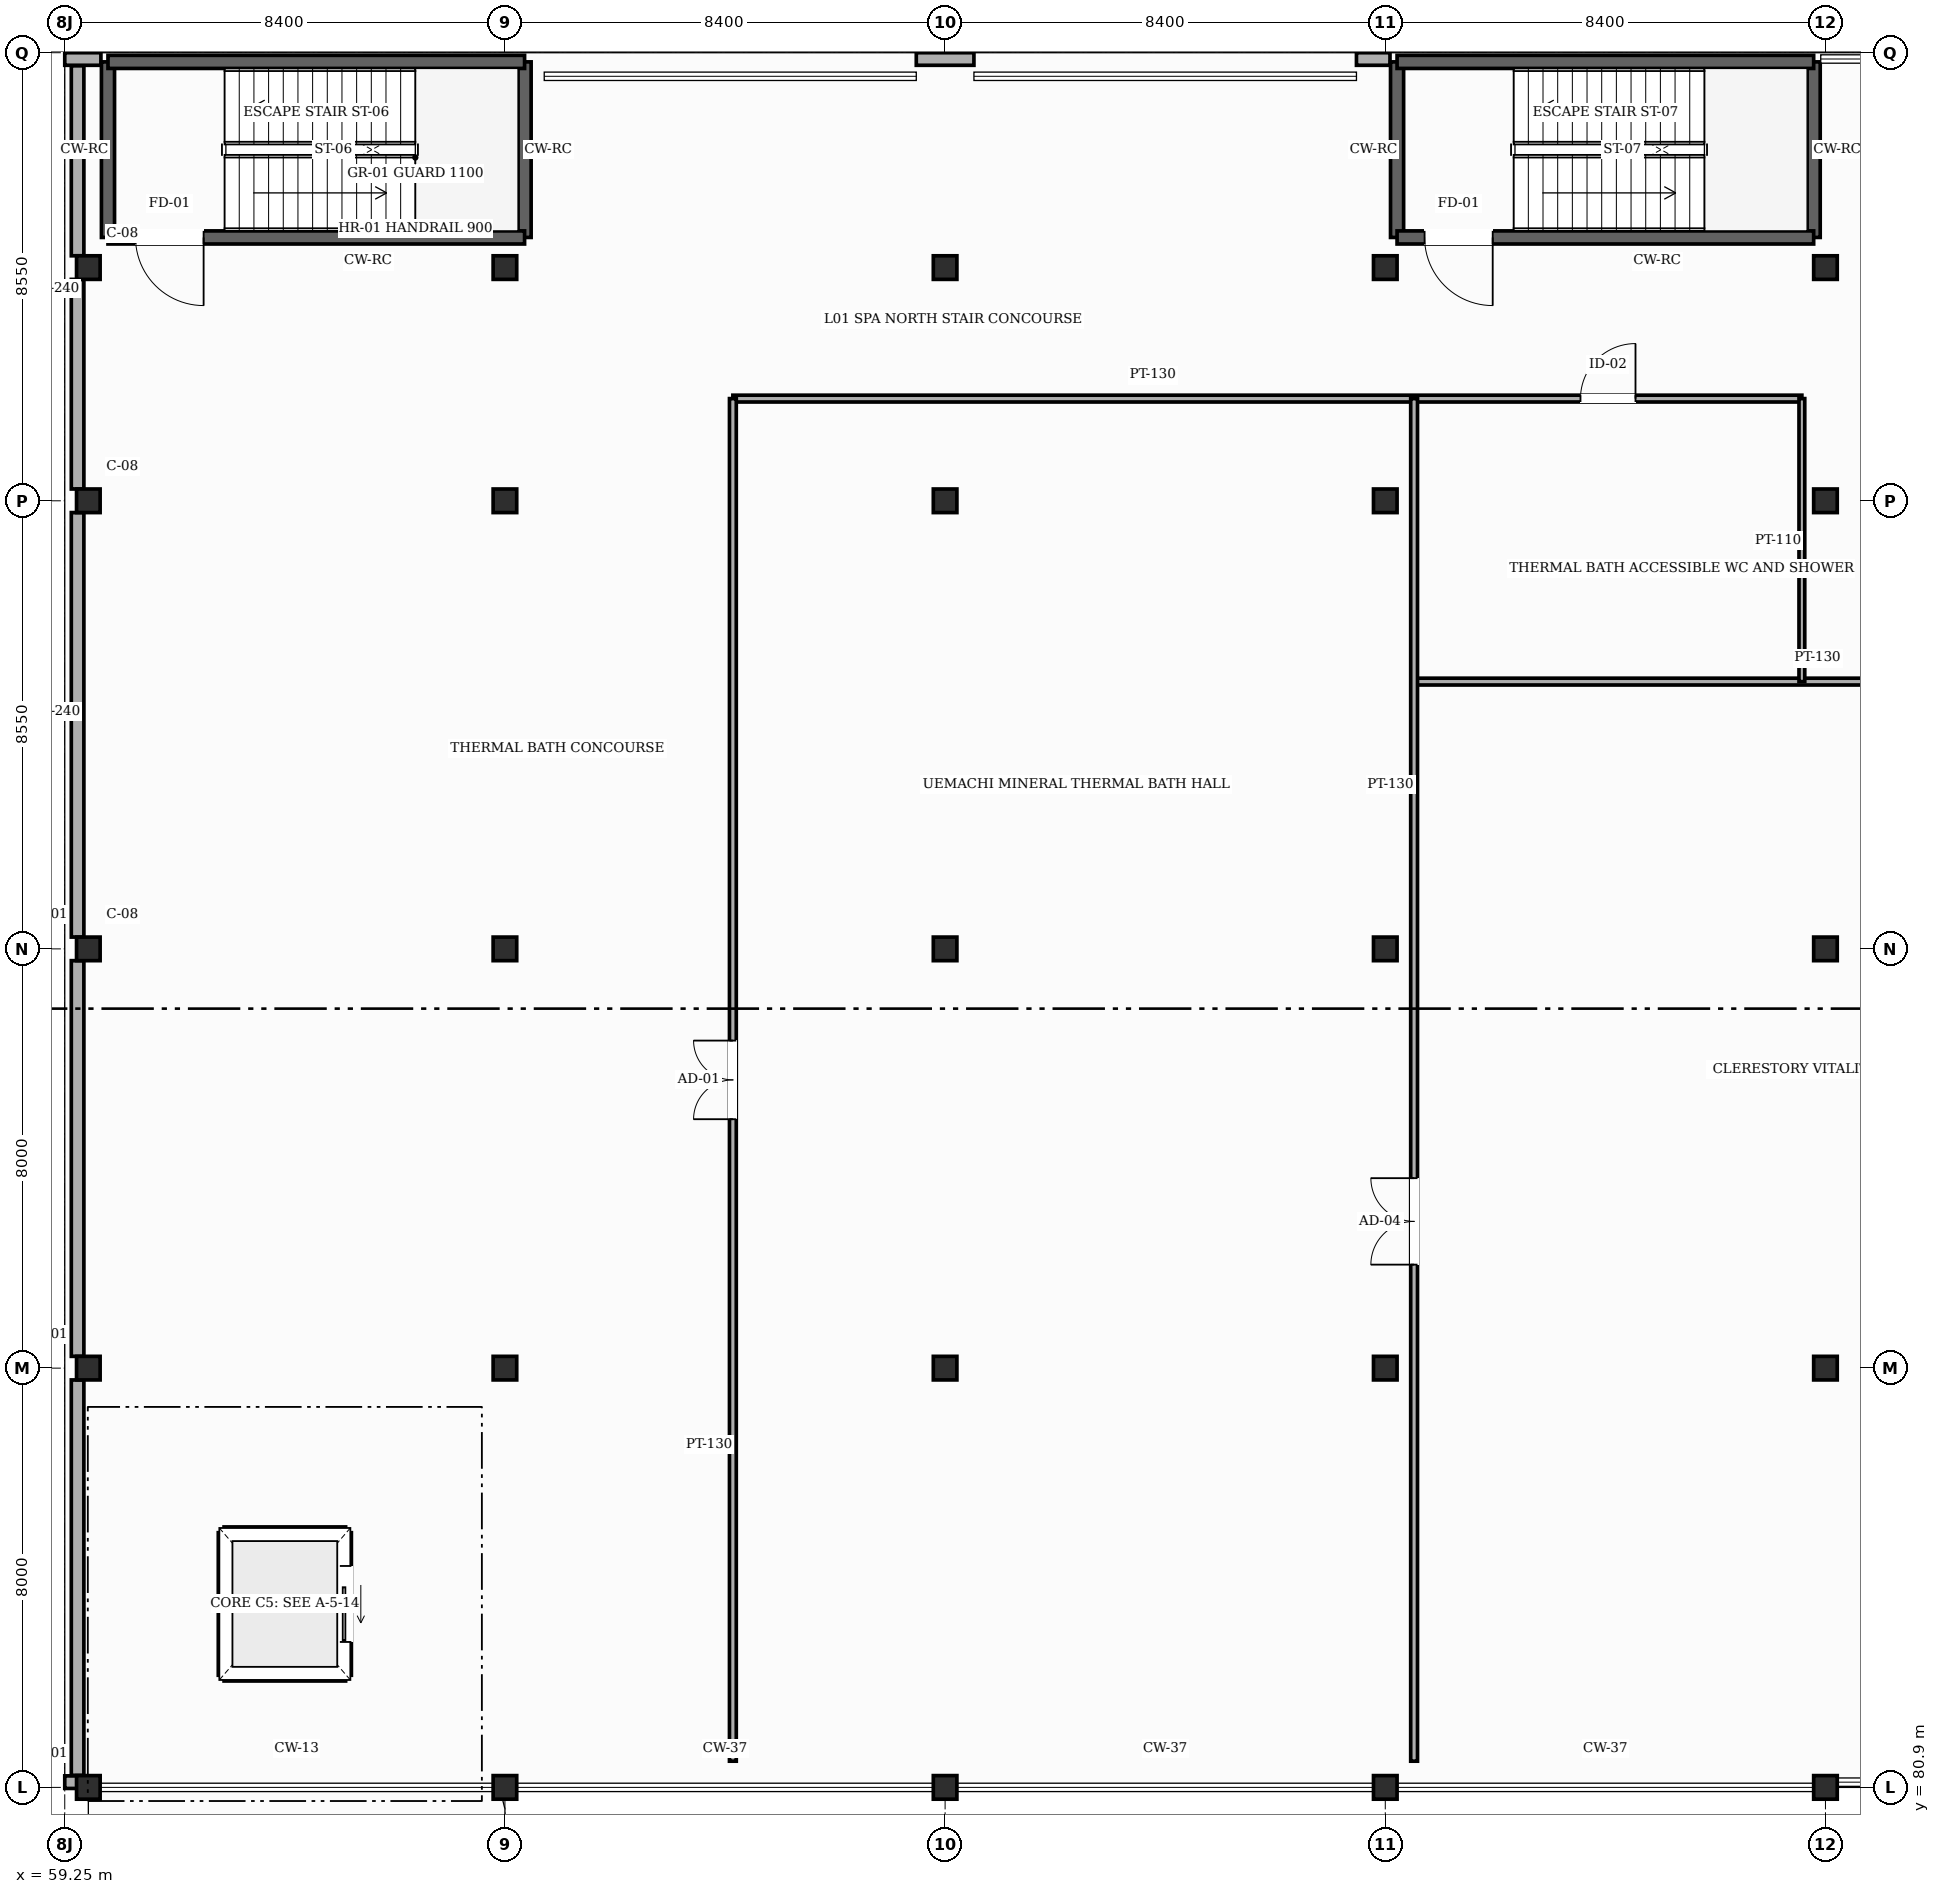
"""IFC4 building model, lengths in metres.
Left out: names, types, materials, properties, quantities, classifications, styles, units other than length and angle.
Written with IfcOpenShell. Run it as: python <this file> out.ifc"""

import sys

from ifc_helpers import new_model, si_unit, direction, frame, frame_2d, origin, origin_2d, place, context, subcontext, project, spatial, rectangle, hollow_rectangle, extrude, element, fill, save


model = new_model("IFC4")
c1 = context("Model", 3, precision=1e-05, world=origin(), true_north=direction((0.0, 1.0)))
c2 = subcontext(c1, "Body", "Model", "MODEL_VIEW")
j1 = project(units=[si_unit("LENGTHUNIT", "METRE"), si_unit("PLANEANGLEUNIT", "RADIAN")], contexts=[c1])
p1 = place(None, origin())
s1 = spatial("IfcSite", under=j1, at=p1, CompositionType="ELEMENT")
p2 = place(p1, origin())
s2 = spatial("IfcBuilding", under=s1, at=p2, CompositionType="ELEMENT")
p3 = place(p2, frame((0.0, 0.0, 5.4)))
s3 = spatial("IfcBuildingStorey", under=s2, at=p3, CompositionType="ELEMENT", Elevation=5.4)
for number, where, z_axis, x_axis in (
    (1, (59.7, 80.9, 0.0), (0.0, 0.0, 1.0), (1.0, 0.0, 0.0)),
    (2, (59.7, 88.9, 0.0), (0.0, 0.0, 1.0), (1.0, 0.0, 0.0)),
    (3, (59.7, 96.9, 0.0), (0.0, 0.0, 1.0), (1.0, 0.0, 0.0)),
    (4, (59.7, 105.45, 0.0), (0.0, 0.0, 1.0), (1.0, 0.0, 0.0)),
    (5, (59.7, 109.9, 0.0), (0.0, 0.0, 1.0), (1.0, 0.0, 0.0)),
    (6, (67.65, 80.9, 0.0), (0.0, 0.0, 1.0), (1.0, 0.0, 0.0)),
    (7, (67.65, 88.9, 0.0), (0.0, 0.0, 1.0), (1.0, 0.0, 0.0)),
    (8, (67.65, 96.9, 0.0), (0.0, 0.0, 1.0), (1.0, 0.0, 0.0)),
    (9, (67.65, 105.45, 0.0), (0.0, 0.0, 1.0), (1.0, 0.0, 0.0)),
    (10, (67.65, 109.9, 0.0), (0.0, 0.0, 1.0), (1.0, 0.0, 0.0)),
    (11, (76.05, 80.9, 0.0), (0.0, 0.0, 1.0), (1.0, 0.0, 0.0)),
    (12, (76.05, 88.9, 0.0), (0.0, 0.0, 1.0), (1.0, 0.0, 0.0)),
    (13, (76.05, 96.9, 0.0), (0.0, 0.0, 1.0), (1.0, 0.0, 0.0)),
    (14, (76.05, 105.45, 0.0), (0.0, 0.0, 1.0), (1.0, 0.0, 0.0)),
    (15, (76.05, 109.9, 0.0), (0.0, 0.0, 1.0), (1.0, 0.0, 0.0)),
    (16, (84.45, 80.9, 0.0), (0.0, 0.0, 1.0), (1.0, 0.0, 0.0)),
    (17, (84.45, 88.9, 0.0), (0.0, 0.0, 1.0), (1.0, 0.0, 0.0)),
    (18, (84.45, 96.9, 0.0), (0.0, 0.0, 1.0), (1.0, 0.0, 0.0)),
    (19, (84.45, 105.45, 0.0), (0.0, 0.0, 1.0), (1.0, 0.0, 0.0)),
    (20, (84.45, 109.9, 0.0), (0.0, 0.0, 1.0), (1.0, 0.0, 0.0)),
    (21, (92.85, 80.9, 0.0), (0.0, 0.0, 1.0), (1.0, 0.0, 0.0)),
    (22, (92.85, 88.9, 0.0), (0.0, 0.0, 1.0), (1.0, 0.0, 0.0)),
    (23, (92.85, 96.9, 0.0), (0.0, 0.0, 1.0), (1.0, 0.0, 0.0)),
    (24, (92.85, 105.45, 0.0), (0.0, 0.0, 1.0), (1.0, 0.0, 0.0)),
    (25, (92.85, 109.9, 0.0), (0.0, 0.0, 1.0), (1.0, 0.0, 0.0)),
):
    element("IfcColumn", number, at=place(p3, frame(where, z_axis=z_axis, x_axis=x_axis)), inside=s3, PredefinedType="COLUMN", context=c2, shape_type="SweptSolid", body=[
        extrude(hollow_rectangle(XDim=0.45, YDim=0.45, WallThickness=0.019, InnerFilletRadius=0.019, OuterFilletRadius=0.038, at=origin_2d()), origin(), (0.0, 0.0, 1.0), 4.8),
    ])
p4 = place(p3, frame((59.925, 81.0, 0.0), z_axis=(0.0, 0.0, 1.0), x_axis=(-1.0, 0.0, 0.0)))
e26 = element("IfcWall", 26, at=p4, inside=s3, PredefinedType="SOLIDWALL", context=c2, shape_type="SweptSolid", body=[
    extrude(rectangle(XDim=0.675, YDim=0.24, at=frame_2d((0.337, 0.0))), origin(), (0.0, 0.0, 1.0), 4.535),
])
p5 = place(p3, frame((59.25, 113.88, 0.0), z_axis=(0.0, 0.0, 1.0), x_axis=(1.0, 0.0, 0.0)))
e27 = element("IfcWall", 27, at=p5, inside=s3, PredefinedType="SOLIDWALL", context=c2, shape_type="SweptSolid", body=[
    extrude(rectangle(XDim=0.69, YDim=0.24, at=frame_2d((0.345, 0.0))), origin(), (0.0, 0.0, 1.0), 4.535),
])
p6 = place(p3, frame((75.5, 113.88, 0.0), z_axis=(0.0, 0.0, 1.0), x_axis=(1.0, 0.0, 0.0)))
e28 = element("IfcWall", 28, at=p6, inside=s3, PredefinedType="SOLIDWALL", context=c2, shape_type="SweptSolid", body=[
    extrude(rectangle(XDim=1.1, YDim=0.24, at=frame_2d((0.55, 0.0))), origin(), (0.0, 0.0, 1.0), 4.535),
])
p7 = place(p3, frame((83.9, 113.88, 0.0), z_axis=(0.0, 0.0, 1.0), x_axis=(1.0, 0.0, 0.0)))
e29 = element("IfcWall", 29, at=p7, inside=s3, PredefinedType="SOLIDWALL", context=c2, shape_type="SweptSolid", body=[
    extrude(rectangle(XDim=0.64, YDim=0.24, at=frame_2d((0.32, 0.0))), origin(), (0.0, 0.0, 1.0), 4.535),
])
p8 = place(p3, frame((59.495, 81.13, 0.0), z_axis=(0.0, 0.0, 1.0), x_axis=(0.0, 1.0, 0.0)))
e30 = element("IfcWall", 30, at=p8, inside=s3, PredefinedType="SOLIDWALL", context=c2, shape_type="SweptSolid", body=[
    extrude(rectangle(XDim=7.545, YDim=0.24, at=frame_2d((3.772, 0.0))), origin(), (0.0, 0.0, 1.0), 3.875),
])
p9 = place(p3, frame((59.495, 89.125, 0.0), z_axis=(0.0, 0.0, 1.0), x_axis=(0.0, 1.0, 0.0)))
e31 = element("IfcWall", 31, at=p9, inside=s3, PredefinedType="SOLIDWALL", context=c2, shape_type="SweptSolid", body=[
    extrude(rectangle(XDim=7.55, YDim=0.24, at=frame_2d((3.775, 0.0))), origin(), (0.0, 0.0, 1.0), 3.875),
])
p10 = place(p3, frame((59.495, 97.125, 0.0), z_axis=(0.0, 0.0, 1.0), x_axis=(0.0, 1.0, 0.0)))
e32 = element("IfcWall", 32, at=p10, inside=s3, PredefinedType="SOLIDWALL", context=c2, shape_type="SweptSolid", body=[
    extrude(rectangle(XDim=8.1, YDim=0.24, at=frame_2d((4.05, 0.0))), origin(), (0.0, 0.0, 1.0), 3.875),
])
p11 = place(p3, frame((59.495, 105.675, 0.0), z_axis=(0.0, 0.0, 1.0), x_axis=(0.0, 1.0, 0.0)))
e33 = element("IfcWall", 33, at=p11, inside=s3, PredefinedType="SOLIDWALL", context=c2, shape_type="SweptSolid", body=[
    extrude(rectangle(XDim=4.0, YDim=0.24, at=frame_2d((2.0, 0.0))), origin(), (0.0, 0.0, 1.0), 3.875),
])
p12 = place(p3, frame((59.495, 110.125, 0.0), z_axis=(0.0, 0.0, 1.0), x_axis=(0.0, 1.0, 0.0)))
e34 = element("IfcWall", 34, at=p12, inside=s3, PredefinedType="SOLIDWALL", context=c2, shape_type="SweptSolid", body=[
    extrude(rectangle(XDim=3.625, YDim=0.24, at=frame_2d((1.812, 0.0))), origin(), (0.0, 0.0, 1.0), 4.535),
])
for number, where, z_axis, x_axis in (
    (35, (60.075, 110.475, 0.0), (0.0, 0.0, 1.0), (0.0, 1.0, 0.0)),
    (36, (68.025, 113.825, 0.0), (0.0, 0.0, 1.0), (0.0, -1.0, 0.0)),
):
    element("IfcWall", number, at=place(p3, frame(where, z_axis=z_axis, x_axis=x_axis)), inside=s3, PredefinedType="SHEAR", context=c2, shape_type="SweptSolid", body=[
        extrude(rectangle(XDim=3.35, YDim=0.25, at=frame_2d((1.675, 0.0))), origin(), (0.0, 0.0, 1.0), 4.55),
    ])
p13 = place(p3, frame((68.025, 110.475, 0.0), z_axis=(0.0, 0.0, 1.0), x_axis=(-1.0, 0.0, 0.0)))
e37 = element("IfcWall", 37, at=p13, inside=s3, PredefinedType="SHEAR", context=c2, shape_type="SweptSolid", body=[
    extrude(rectangle(XDim=7.95, YDim=0.25, at=frame_2d((3.975, 0.0))), origin(), (0.0, 0.0, 1.0), 4.55),
])
p14 = place(p13, frame((6.125, 0.0, 0.0)))
e38 = element("IfcOpeningElement", 38, at=p14, cuts=e37, PredefinedType="OPENING", context=c2, shape_type="SweptSolid", body=[
    extrude(rectangle(XDim=1.3, YDim=2.2, at=frame_2d((0.65, 1.1))), frame((0.0, 0.135, 0.0), z_axis=(0.0, -1.0, 0.0), x_axis=(1.0, 0.0, 0.0)), (0.0, 0.0, 1.0), 0.27),
])
p15 = place(p3, frame((60.075, 113.825, 0.0), z_axis=(0.0, 0.0, 1.0), x_axis=(1.0, 0.0, 0.0)))
e39 = element("IfcWall", 39, at=p15, inside=s3, PredefinedType="SHEAR", context=c2, shape_type="SweptSolid", body=[
    extrude(rectangle(XDim=7.95, YDim=0.25, at=frame_2d((3.975, 0.0))), origin(), (0.0, 0.0, 1.0), 4.55),
])
for number, where, z_axis, x_axis in (
    (40, (84.675, 110.475, 0.0), (0.0, 0.0, 1.0), (0.0, 1.0, 0.0)),
    (41, (92.625, 113.825, 0.0), (0.0, 0.0, 1.0), (0.0, -1.0, 0.0)),
):
    element("IfcWall", number, at=place(p3, frame(where, z_axis=z_axis, x_axis=x_axis)), inside=s3, PredefinedType="SHEAR", context=c2, shape_type="SweptSolid", body=[
        extrude(rectangle(XDim=3.35, YDim=0.25, at=frame_2d((1.675, 0.0))), origin(), (0.0, 0.0, 1.0), 4.55),
    ])
p16 = place(p3, frame((92.625, 110.475, 0.0), z_axis=(0.0, 0.0, 1.0), x_axis=(-1.0, 0.0, 0.0)))
e42 = element("IfcWall", 42, at=p16, inside=s3, PredefinedType="SHEAR", context=c2, shape_type="SweptSolid", body=[
    extrude(rectangle(XDim=7.95, YDim=0.25, at=frame_2d((3.975, 0.0))), origin(), (0.0, 0.0, 1.0), 4.55),
])
p17 = place(p16, frame((6.125, 0.0, 0.0)))
e43 = element("IfcOpeningElement", 43, at=p17, cuts=e42, PredefinedType="OPENING", context=c2, shape_type="SweptSolid", body=[
    extrude(rectangle(XDim=1.3, YDim=2.2, at=frame_2d((0.65, 1.1))), frame((0.0, 0.135, 0.0), z_axis=(0.0, -1.0, 0.0), x_axis=(1.0, 0.0, 0.0)), (0.0, 0.0, 1.0), 0.27),
])
p18 = place(p3, frame((84.675, 113.825, 0.0), z_axis=(0.0, 0.0, 1.0), x_axis=(1.0, 0.0, 0.0)))
e44 = element("IfcWall", 44, at=p18, inside=s3, PredefinedType="SHEAR", context=c2, shape_type="SweptSolid", body=[
    extrude(rectangle(XDim=7.95, YDim=0.25, at=frame_2d((3.975, 0.0))), origin(), (0.0, 0.0, 1.0), 4.55),
])
for number, where, z_axis, x_axis in (
    (45, (62.29, 85.76, 0.0), (0.0, 0.0, 1.0), (1.0, 0.0, 0.0)),
    (46, (62.29, 83.04, 0.0), (0.0, 0.0, 1.0), (1.0, 0.0, 0.0)),
):
    element("IfcWall", number, at=place(p3, frame(where, z_axis=z_axis, x_axis=x_axis)), inside=s3, PredefinedType="SHEAR", context=c2, shape_type="SweptSolid", body=[
        extrude(rectangle(XDim=2.32, YDim=0.22, at=frame_2d((1.16, 0.0))), origin(), (0.0, 0.0, 1.0), 4.55),
    ])
p19 = place(p3, frame((64.61, 83.04, 0.0), z_axis=(0.0, 0.0, 1.0), x_axis=(0.0, 1.0, 0.0)))
e47 = element("IfcWall", 47, at=p19, inside=s3, PredefinedType="SHEAR", context=c2, shape_type="SweptSolid", body=[
    extrude(rectangle(XDim=2.72, YDim=0.22, at=frame_2d((1.36, 0.0))), origin(), (0.0, 0.0, 1.0), 4.55),
])
p20 = place(p19, frame((0.635, 0.0, 0.0)))
e48 = element("IfcOpeningElement", 48, at=p20, cuts=e47, PredefinedType="OPENING", context=c2, shape_type="SweptSolid", body=[
    extrude(rectangle(XDim=1.45, YDim=2.35, at=frame_2d((0.725, 1.175))), frame((0.0, 0.12, 0.0), z_axis=(0.0, -1.0, 0.0), x_axis=(1.0, 0.0, 0.0)), (0.0, 0.0, 1.0), 0.24),
])
p21 = place(p3, frame((62.29, 83.04, 0.0), z_axis=(0.0, 0.0, 1.0), x_axis=(0.0, 1.0, 0.0)))
e49 = element("IfcWall", 49, at=p21, inside=s3, PredefinedType="SHEAR", context=c2, shape_type="SweptSolid", body=[
    extrude(rectangle(XDim=2.72, YDim=0.22, at=frame_2d((1.36, 0.0))), origin(), (0.0, 0.0, 1.0), 4.55),
])
p22 = place(p3, frame((85.0, 102.0, 0.0), z_axis=(0.0, 0.0, 1.0), x_axis=(1.0, 0.0, 0.0)))
e50 = element("IfcWall", 50, at=p22, inside=s3, PredefinedType="PARTITIONING", context=c2, shape_type="SweptSolid", body=[
    extrude(rectangle(XDim=15.4, YDim=0.13, at=frame_2d((7.7, 0.0))), origin(), (0.0, 0.0, 1.0), 4.535),
])
p23 = place(p3, frame((72.0, 107.4, 0.0), z_axis=(0.0, 0.0, 1.0), x_axis=(1.0, 0.0, 0.0)))
e51 = element("IfcWall", 51, at=p23, inside=s3, PredefinedType="PARTITIONING", context=c2, shape_type="SweptSolid", body=[
    extrude(rectangle(XDim=20.4, YDim=0.13, at=frame_2d((10.2, 0.0))), origin(), (0.0, 0.0, 1.0), 4.125),
])
p24 = place(p23, frame((16.175, 0.0, 0.0)))
e52 = element("IfcOpeningElement", 52, at=p24, cuts=e51, PredefinedType="OPENING", context=c2, shape_type="SweptSolid", body=[
    extrude(rectangle(XDim=1.05, YDim=2.2, at=frame_2d((0.525, 1.1))), frame((0.0, 0.075, 0.0), z_axis=(0.0, -1.0, 0.0), x_axis=(1.0, 0.0, 0.0)), (0.0, 0.0, 1.0), 0.15),
])
p25 = place(p3, frame((72.0, 81.4, 0.0), z_axis=(0.0, 0.0, 1.0), x_axis=(0.0, 1.0, 0.0)))
e53 = element("IfcWall", 53, at=p25, inside=s3, PredefinedType="PARTITIONING", context=c2, shape_type="SweptSolid", body=[
    extrude(rectangle(XDim=26.0, YDim=0.13, at=frame_2d((13.0, 0.0))), origin(), (0.0, 0.0, 1.0), 4.535),
])
p26 = place(p25, frame((12.25, 0.0, 0.0)))
e54 = element("IfcOpeningElement", 54, at=p26, cuts=e53, PredefinedType="OPENING", context=c2, shape_type="SweptSolid", body=[
    extrude(rectangle(XDim=1.5, YDim=2.3, at=frame_2d((0.75, 1.15))), frame((0.0, 0.075, 0.0), z_axis=(0.0, -1.0, 0.0), x_axis=(1.0, 0.0, 0.0)), (0.0, 0.0, 1.0), 0.15),
])
p27 = place(p3, frame((85.0, 81.4, 0.0), z_axis=(0.0, 0.0, 1.0), x_axis=(0.0, 1.0, 0.0)))
e55 = element("IfcWall", 55, at=p27, inside=s3, PredefinedType="PARTITIONING", context=c2, shape_type="SweptSolid", body=[
    extrude(rectangle(XDim=26.0, YDim=0.13, at=frame_2d((13.0, 0.0))), origin(), (0.0, 0.0, 1.0), 4.535),
])
p28 = place(p27, frame((9.475, 0.0, 0.0)))
e56 = element("IfcOpeningElement", 56, at=p28, cuts=e55, PredefinedType="OPENING", context=c2, shape_type="SweptSolid", body=[
    extrude(rectangle(XDim=1.65, YDim=2.35, at=frame_2d((0.825, 1.175))), frame((0.0, 0.075, 0.0), z_axis=(0.0, -1.0, 0.0), x_axis=(1.0, 0.0, 0.0)), (0.0, 0.0, 1.0), 0.15),
])
p29 = place(p3, frame((92.4, 102.0, 0.0), z_axis=(0.0, 0.0, 1.0), x_axis=(0.0, 1.0, 0.0)))
e57 = element("IfcWall", 57, at=p29, inside=s3, PredefinedType="PARTITIONING", context=c2, shape_type="SweptSolid", body=[
    extrude(rectangle(XDim=5.4, YDim=0.11, at=frame_2d((2.7, 0.0))), origin(), (0.0, 0.0, 1.0), 4.535),
])
p30 = place(p14, origin())
e58 = element("IfcDoor", 58, at=p30, inside=s3, OperationType="SINGLE_SWING_LEFT", PredefinedType="DOOR", context=c2, shape_type="SweptSolid", body=[
    extrude(rectangle(XDim=1.3, YDim=2.2, at=frame_2d((0.65, 1.1))), frame((0.0, 0.025, 0.0), z_axis=(0.0, -1.0, 0.0), x_axis=(1.0, 0.0, 0.0)), (0.0, 0.0, 1.0), 0.05),
])
fill(e38, e58)
p31 = place(p17, origin())
e59 = element("IfcDoor", 59, at=p31, inside=s3, OperationType="SINGLE_SWING_LEFT", PredefinedType="DOOR", context=c2, shape_type="SweptSolid", body=[
    extrude(rectangle(XDim=1.3, YDim=2.2, at=frame_2d((0.65, 1.1))), frame((0.0, 0.025, 0.0), z_axis=(0.0, -1.0, 0.0), x_axis=(1.0, 0.0, 0.0)), (0.0, 0.0, 1.0), 0.05),
])
fill(e43, e59)
p32 = place(p20, origin())
e60 = element("IfcDoor", 60, at=p32, inside=s3, OperationType="SLIDING_TO_LEFT", PredefinedType="DOOR", context=c2, shape_type="SweptSolid", body=[
    extrude(rectangle(XDim=1.45, YDim=2.35, at=frame_2d((0.725, 1.175))), frame((0.0, 0.025, 0.0), z_axis=(0.0, -1.0, 0.0), x_axis=(1.0, 0.0, 0.0)), (0.0, 0.0, 1.0), 0.05),
])
fill(e48, e60)
p33 = place(p26, origin())
e61 = element("IfcDoor", 61, at=p33, inside=s3, OperationType="DOUBLE_DOOR_SINGLE_SWING", PredefinedType="DOOR", context=c2, shape_type="SweptSolid", body=[
    extrude(rectangle(XDim=1.5, YDim=2.3, at=frame_2d((0.75, 1.15))), frame((0.0, 0.025, 0.0), z_axis=(0.0, -1.0, 0.0), x_axis=(1.0, 0.0, 0.0)), (0.0, 0.0, 1.0), 0.05),
])
fill(e54, e61)
p34 = place(p28, origin())
e62 = element("IfcDoor", 62, at=p34, inside=s3, OperationType="DOUBLE_DOOR_SINGLE_SWING", PredefinedType="DOOR", context=c2, shape_type="SweptSolid", body=[
    extrude(rectangle(XDim=1.65, YDim=2.35, at=frame_2d((0.825, 1.175))), frame((0.0, 0.025, 0.0), z_axis=(0.0, -1.0, 0.0), x_axis=(1.0, 0.0, 0.0)), (0.0, 0.0, 1.0), 0.05),
])
fill(e56, e62)
p35 = place(p24, origin())
e63 = element("IfcDoor", 63, at=p35, inside=s3, OperationType="SINGLE_SWING_RIGHT", PredefinedType="DOOR", context=c2, shape_type="SweptSolid", body=[
    extrude(rectangle(XDim=1.05, YDim=2.2, at=frame_2d((0.525, 1.1))), frame((0.0, 0.025, 0.0), z_axis=(0.0, -1.0, 0.0), x_axis=(1.0, 0.0, 0.0)), (0.0, 0.0, 1.0), 0.05),
])
fill(e52, e63)
save(model, sys.argv[1])
